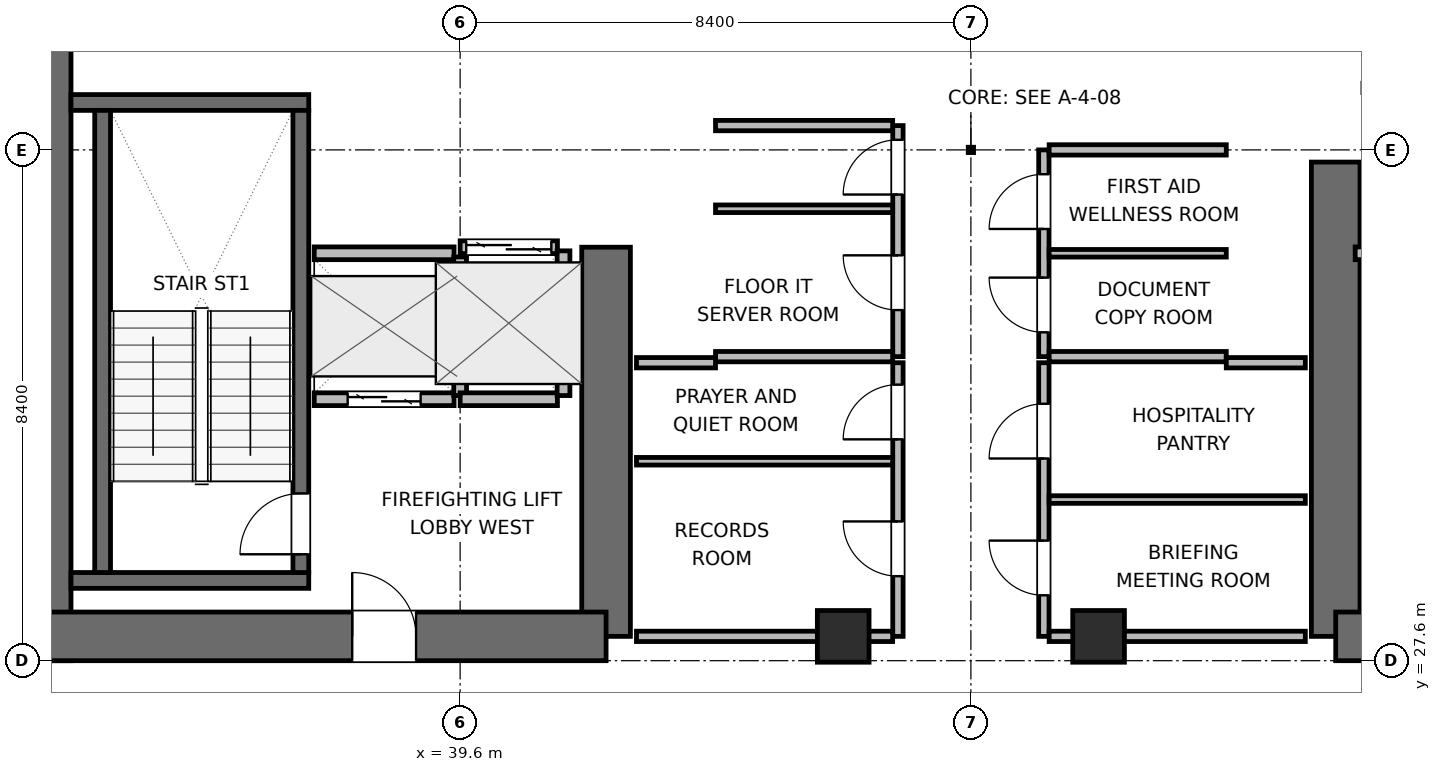
"""IFC4 building model, lengths in metres.
Left out: names, types, materials, properties, quantities, classifications, styles, units other than length and angle.
Written with IfcOpenShell. Run it as: python <this file> out.ifc"""

import sys

from ifc_helpers import new_model, si_unit, direction, frame, frame_2d, origin, origin_2d, place, context, subcontext, project, spatial, rectangle, extrude, element, fill, save


model = new_model("IFC4")
c1 = context("Model", 3, precision=1e-05, world=origin(), true_north=direction((0.0, 1.0)))
c2 = subcontext(c1, "Body", "Model", "MODEL_VIEW")
j1 = project(units=[si_unit("LENGTHUNIT", "METRE"), si_unit("PLANEANGLEUNIT", "RADIAN")], contexts=[c1])
p1 = place(None, origin())
s1 = spatial("IfcSite", under=j1, at=p1, CompositionType="ELEMENT")
p2 = place(p1, origin())
s2 = spatial("IfcBuilding", under=s1, at=p2, CompositionType="ELEMENT")
p3 = place(p2, frame((0.0, 0.0, 177.9)))
s3 = spatial("IfcBuildingStorey", under=s2, at=p3, CompositionType="ELEMENT", Elevation=177.9)
p4 = place(p3, frame((32.8, 27.6, 0.0), z_axis=(0.0, 0.0, 1.0), x_axis=(0.0, 1.0, 0.0)))
e1 = element("IfcWall", 1, at=p4, inside=s3, PredefinedType="SHEAR", context=c2, shape_type="SweptSolid", body=[
    extrude(rectangle(XDim=16.8, YDim=0.8, at=frame_2d((8.4, 0.0))), origin(), (0.0, 0.0, 1.0), 3.9),
])
p5 = place(p3, frame((42.0, 28.0, 0.0), z_axis=(0.0, 0.0, 1.0), x_axis=(0.0, 1.0, 0.0)))
e2 = element("IfcWall", 2, at=p5, inside=s3, PredefinedType="SHEAR", context=c2, shape_type="SweptSolid", body=[
    extrude(rectangle(XDim=6.4, YDim=0.8, at=frame_2d((3.2, 0.0))), origin(), (0.0, 0.0, 1.0), 3.9),
])
p6 = place(p3, frame((32.8, 28.0, 0.0), z_axis=(0.0, 0.0, 1.0), x_axis=(1.0, 0.0, 0.0)))
e3 = element("IfcWall", 3, at=p6, inside=s3, PredefinedType="SHEAR", context=c2, shape_type="SweptSolid", body=[
    extrude(rectangle(XDim=9.2, YDim=0.8, at=frame_2d((4.6, 0.0))), origin(), (0.0, 0.0, 1.0), 3.9),
])
p7 = place(p6, frame((5.025, 0.0, 0.0)))
e4 = element("IfcOpeningElement", 4, at=p7, cuts=e3, PredefinedType="OPENING", context=c2, shape_type="SweptSolid", body=[
    extrude(rectangle(XDim=1.05, YDim=2.04, at=frame_2d((0.525, 1.02))), frame((0.0, 0.41, 0.0), z_axis=(0.0, -1.0, 0.0), x_axis=(1.0, 0.0, 0.0)), (0.0, 0.0, 1.0), 0.82),
])
p8 = place(p3, frame((54.0, 28.0, 0.0), z_axis=(0.0, 0.0, 1.0), x_axis=(0.0, 1.0, 0.0)))
e5 = element("IfcWall", 5, at=p8, inside=s3, PredefinedType="SHEAR", context=c2, shape_type="SweptSolid", body=[
    extrude(rectangle(XDim=7.8, YDim=0.8, at=frame_2d((3.9, 0.0))), origin(), (0.0, 0.0, 1.0), 3.9),
])
p9 = place(p3, frame((54.0, 28.0, 0.0), z_axis=(0.0, 0.0, 1.0), x_axis=(1.0, 0.0, 0.0)))
e6 = element("IfcWall", 6, at=p9, inside=s3, PredefinedType="SHEAR", context=c2, shape_type="SweptSolid", body=[
    extrude(rectangle(XDim=9.2, YDim=0.8, at=frame_2d((4.6, 0.0))), origin(), (0.0, 0.0, 1.0), 3.9),
])
p10 = place(p9, frame((3.975, 0.0, 0.0)))
e7 = element("IfcOpeningElement", 7, at=p10, cuts=e6, PredefinedType="OPENING", context=c2, shape_type="SweptSolid", body=[
    extrude(rectangle(XDim=1.05, YDim=2.04, at=frame_2d((0.525, 1.02))), frame((0.0, 0.41, 0.0), z_axis=(0.0, -1.0, 0.0), x_axis=(1.0, 0.0, 0.0)), (0.0, 0.0, 1.0), 0.82),
])
for number, where, z_axis, x_axis in (
    (8, (33.2, 28.92, 0.0), (0.0, 0.0, 1.0), (1.0, 0.0, 0.0)),
    (9, (33.2, 36.78, 0.0), (0.0, 0.0, 1.0), (1.0, 0.0, 0.0)),
):
    element("IfcWall", number, at=place(p3, frame(where, z_axis=z_axis, x_axis=x_axis)), inside=s3, PredefinedType="SHEAR", context=c2, shape_type="SweptSolid", body=[
        extrude(rectangle(XDim=3.91, YDim=0.26, at=frame_2d((1.955, 0.0))), origin(), (0.0, 0.0, 1.0), 3.9),
    ])
p11 = place(p3, frame((33.72, 29.05, 0.0), z_axis=(0.0, 0.0, 1.0), x_axis=(0.0, 1.0, 0.0)))
e10 = element("IfcWall", 10, at=p11, inside=s3, PredefinedType="SHEAR", context=c2, shape_type="SweptSolid", body=[
    extrude(rectangle(XDim=7.6, YDim=0.26, at=frame_2d((3.8, 0.0))), origin(), (0.0, 0.0, 1.0), 3.9),
])
p12 = place(p3, frame((36.98, 29.05, 0.0), z_axis=(0.0, 0.0, 1.0), x_axis=(0.0, 1.0, 0.0)))
e11 = element("IfcWall", 11, at=p12, inside=s3, PredefinedType="SHEAR", context=c2, shape_type="SweptSolid", body=[
    extrude(rectangle(XDim=7.6, YDim=0.26, at=frame_2d((3.8, 0.0))), origin(), (0.0, 0.0, 1.0), 3.9),
])
p13 = place(p12, frame((0.3, 0.0, 0.0)))
e12 = element("IfcOpeningElement", 12, at=p13, cuts=e11, PredefinedType="OPENING", context=c2, shape_type="SweptSolid", body=[
    extrude(rectangle(XDim=1.0, YDim=2.04, at=frame_2d((0.5, 1.02))), frame((0.0, 0.14, 0.0), z_axis=(0.0, -1.0, 0.0), x_axis=(1.0, 0.0, 0.0)), (0.0, 0.0, 1.0), 0.28),
])
for number, where, z_axis, x_axis in (
    (13, (45.9, 28.0, 0.0), (0.0, 0.0, 1.0), (1.0, 0.0, 0.0)),
    (14, (50.1, 28.0, 0.0), (0.0, 0.0, 1.0), (1.0, 0.0, 0.0)),
):
    element("IfcColumn", number, at=place(p3, frame(where, z_axis=z_axis, x_axis=x_axis)), inside=s3, PredefinedType="COLUMN", context=c2, shape_type="SweptSolid", body=[
        extrude(rectangle(XDim=0.85, YDim=0.85, at=origin_2d()), origin(), (0.0, 0.0, 1.0), 3.9),
    ])
p14 = place(p3, frame((37.2, 31.9, 0.0), z_axis=(0.0, 0.0, 1.0), x_axis=(1.0, 0.0, 0.0)))
e15 = element("IfcWall", 15, at=p14, inside=s3, PredefinedType="PARTITIONING", context=c2, shape_type="SweptSolid", body=[
    extrude(rectangle(XDim=2.3, YDim=0.21, at=frame_2d((1.15, 0.0))), origin(), (0.0, 0.0, 1.0), 3.68),
])
p15 = place(p14, frame((0.55, 0.0, 0.0)))
e16 = element("IfcOpeningElement", 16, at=p15, cuts=e15, PredefinedType="OPENING", context=c2, shape_type="SweptSolid", body=[
    extrude(rectangle(XDim=1.2, YDim=2.04, at=frame_2d((0.6, 1.02))), frame((0.0, 0.115, 0.0), z_axis=(0.0, -1.0, 0.0), x_axis=(1.0, 0.0, 0.0)), (0.0, 0.0, 1.0), 0.23),
])
p16 = place(p3, frame((37.2, 34.3, 0.0), z_axis=(0.0, 0.0, 1.0), x_axis=(1.0, 0.0, 0.0)))
e17 = element("IfcWall", 17, at=p16, inside=s3, PredefinedType="PARTITIONING", context=c2, shape_type="SweptSolid", body=[
    extrude(rectangle(XDim=2.3, YDim=0.21, at=frame_2d((1.15, 0.0))), origin(), (0.0, 0.0, 1.0), 3.68),
])
p17 = place(p3, frame((39.6, 31.96, 0.0), z_axis=(0.0, 0.0, 1.0), x_axis=(0.0, 1.0, 0.0)))
e18 = element("IfcWall", 18, at=p17, inside=s3, PredefinedType="PARTITIONING", context=c2, shape_type="SweptSolid", body=[
    extrude(rectangle(XDim=2.28, YDim=0.21, at=frame_2d((1.14, 0.0))), origin(), (0.0, 0.0, 1.0), 3.68),
])
p18 = place(p3, frame((54.32, 34.3, 0.0), z_axis=(0.0, 0.0, 1.0), x_axis=(1.0, 0.0, 0.0)))
e19 = element("IfcWall", 19, at=p18, inside=s3, PredefinedType="PARTITIONING", context=c2, shape_type="SweptSolid", body=[
    extrude(rectangle(XDim=3.48, YDim=0.21, at=frame_2d((1.74, 0.0))), origin(), (0.0, 0.0, 1.0), 3.68),
])
p19 = place(p3, frame((39.6, 34.4, 0.0), z_axis=(0.0, 0.0, 1.0), x_axis=(1.0, 0.0, 0.0)))
e20 = element("IfcWall", 20, at=p19, inside=s3, PredefinedType="PARTITIONING", context=c2, shape_type="SweptSolid", body=[
    extrude(rectangle(XDim=1.6, YDim=0.21, at=frame_2d((0.8, 0.0))), origin(), (0.0, 0.0, 1.0), 3.68),
])
p20 = place(p19, frame((0.1, 0.0, 0.0)))
e21 = element("IfcOpeningElement", 21, at=p20, cuts=e20, PredefinedType="OPENING", context=c2, shape_type="SweptSolid", body=[
    extrude(rectangle(XDim=1.4, YDim=2.06, at=frame_2d((0.7, 1.03))), frame((0.0, 0.115, 0.0), z_axis=(0.0, -1.0, 0.0), x_axis=(1.0, 0.0, 0.0)), (0.0, 0.0, 1.0), 0.23),
])
p21 = place(p3, frame((39.6, 31.9, 0.0), z_axis=(0.0, 0.0, 1.0), x_axis=(1.0, 0.0, 0.0)))
e22 = element("IfcWall", 22, at=p21, inside=s3, PredefinedType="PARTITIONING", context=c2, shape_type="SweptSolid", body=[
    extrude(rectangle(XDim=1.6, YDim=0.21, at=frame_2d((0.8, 0.0))), origin(), (0.0, 0.0, 1.0), 3.68),
])
p22 = place(p3, frame((41.3, 31.96, 0.0), z_axis=(0.0, 0.0, 1.0), x_axis=(0.0, 1.0, 0.0)))
e23 = element("IfcWall", 23, at=p22, inside=s3, PredefinedType="PARTITIONING", context=c2, shape_type="SweptSolid", body=[
    extrude(rectangle(XDim=2.38, YDim=0.21, at=frame_2d((1.19, 0.0))), origin(), (0.0, 0.0, 1.0), 3.68),
])
p23 = place(p3, frame((46.8, 32.6, 0.0), z_axis=(0.0, 0.0, 1.0), x_axis=(0.0, 1.0, 0.0)))
e24 = element("IfcWall", 24, at=p23, inside=s3, PredefinedType="PARTITIONING", context=c2, shape_type="SweptSolid", body=[
    extrude(rectangle(XDim=3.8, YDim=0.17, at=frame_2d((1.9, 0.0))), origin(), (0.0, 0.0, 1.0), 3.68),
])
p24 = place(p23, frame((0.766, 0.0, 0.0)))
e25 = element("IfcOpeningElement", 25, at=p24, cuts=e24, PredefinedType="OPENING", context=c2, shape_type="SweptSolid", body=[
    extrude(rectangle(XDim=0.9, YDim=2.02, at=frame_2d((0.45, 1.01))), frame((0.0, 0.095, 0.0), z_axis=(0.0, -1.0, 0.0), x_axis=(1.0, 0.0, 0.0)), (0.0, 0.0, 1.0), 0.19),
])
p25 = place(p23, frame((2.666, 0.0, 0.0)))
e26 = element("IfcOpeningElement", 26, at=p25, cuts=e24, PredefinedType="OPENING", context=c2, shape_type="SweptSolid", body=[
    extrude(rectangle(XDim=0.9, YDim=2.02, at=frame_2d((0.45, 1.01))), frame((0.0, 0.095, 0.0), z_axis=(0.0, -1.0, 0.0), x_axis=(1.0, 0.0, 0.0)), (0.0, 0.0, 1.0), 0.19),
])
for number, where, z_axis, x_axis in (
    (27, (43.8, 32.6, 0.0), (0.0, 0.0, 1.0), (1.0, 0.0, 0.0)),
    (28, (43.8, 36.4, 0.0), (0.0, 0.0, 1.0), (1.0, 0.0, 0.0)),
):
    element("IfcWall", number, at=place(p3, frame(where, z_axis=z_axis, x_axis=x_axis)), inside=s3, PredefinedType="PARTITIONING", context=c2, shape_type="SweptSolid", body=[
        extrude(rectangle(XDim=2.913, YDim=0.17, at=frame_2d((1.457, 0.0))), origin(), (0.0, 0.0, 1.0), 3.68),
    ])
p26 = place(p3, frame((43.8, 35.032, 0.0), z_axis=(0.0, 0.0, 1.0), x_axis=(1.0, 0.0, 0.0)))
e29 = element("IfcWall", 29, at=p26, inside=s3, PredefinedType="PARTITIONING", context=c2, shape_type="SweptSolid", body=[
    extrude(rectangle(XDim=2.913, YDim=0.125, at=frame_2d((1.457, 0.0))), origin(), (0.0, 0.0, 1.0), 3.68),
])
p27 = place(p3, frame((49.2, 32.6, 0.0), z_axis=(0.0, 0.0, 1.0), x_axis=(0.0, 1.0, 0.0)))
e30 = element("IfcWall", 30, at=p27, inside=s3, PredefinedType="PARTITIONING", context=c2, shape_type="SweptSolid", body=[
    extrude(rectangle(XDim=3.4, YDim=0.17, at=frame_2d((1.7, 0.0))), origin(), (0.0, 0.0, 1.0), 3.68),
])
p28 = place(p27, frame((0.4, 0.0, 0.0)))
e31 = element("IfcOpeningElement", 31, at=p28, cuts=e30, PredefinedType="OPENING", context=c2, shape_type="SweptSolid", body=[
    extrude(rectangle(XDim=0.9, YDim=2.02, at=frame_2d((0.45, 1.01))), frame((0.0, 0.095, 0.0), z_axis=(0.0, -1.0, 0.0), x_axis=(1.0, 0.0, 0.0)), (0.0, 0.0, 1.0), 0.19),
])
p29 = place(p27, frame((2.1, 0.0, 0.0)))
e32 = element("IfcOpeningElement", 32, at=p29, cuts=e30, PredefinedType="OPENING", context=c2, shape_type="SweptSolid", body=[
    extrude(rectangle(XDim=0.9, YDim=2.02, at=frame_2d((0.45, 1.01))), frame((0.0, 0.095, 0.0), z_axis=(0.0, -1.0, 0.0), x_axis=(1.0, 0.0, 0.0)), (0.0, 0.0, 1.0), 0.19),
])
for number, where, z_axis, x_axis in (
    (33, (49.287, 32.6, 0.0), (0.0, 0.0, 1.0), (1.0, 0.0, 0.0)),
    (34, (49.287, 36.0, 0.0), (0.0, 0.0, 1.0), (1.0, 0.0, 0.0)),
):
    element("IfcWall", number, at=place(p3, frame(where, z_axis=z_axis, x_axis=x_axis)), inside=s3, PredefinedType="PARTITIONING", context=c2, shape_type="SweptSolid", body=[
        extrude(rectangle(XDim=2.913, YDim=0.17, at=frame_2d((1.457, 0.0))), origin(), (0.0, 0.0, 1.0), 3.68),
    ])
p30 = place(p3, frame((49.287, 34.3, 0.0), z_axis=(0.0, 0.0, 1.0), x_axis=(1.0, 0.0, 0.0)))
e35 = element("IfcWall", 35, at=p30, inside=s3, PredefinedType="PARTITIONING", context=c2, shape_type="SweptSolid", body=[
    extrude(rectangle(XDim=2.913, YDim=0.125, at=frame_2d((1.457, 0.0))), origin(), (0.0, 0.0, 1.0), 3.68),
])
p31 = place(p3, frame((46.8, 28.0, 0.0), z_axis=(0.0, 0.0, 1.0), x_axis=(0.0, 1.0, 0.0)))
e36 = element("IfcWall", 36, at=p31, inside=s3, PredefinedType="PARTITIONING", context=c2, shape_type="SweptSolid", body=[
    extrude(rectangle(XDim=4.5, YDim=0.17, at=frame_2d((2.25, 0.0))), origin(), (0.0, 0.0, 1.0), 3.68),
])
p32 = place(p31, frame((0.99, 0.0, 0.0)))
e37 = element("IfcOpeningElement", 37, at=p32, cuts=e36, PredefinedType="OPENING", context=c2, shape_type="SweptSolid", body=[
    extrude(rectangle(XDim=0.9, YDim=2.02, at=frame_2d((0.45, 1.01))), frame((0.0, 0.095, 0.0), z_axis=(0.0, -1.0, 0.0), x_axis=(1.0, 0.0, 0.0)), (0.0, 0.0, 1.0), 0.19),
])
p33 = place(p31, frame((3.24, 0.0, 0.0)))
e38 = element("IfcOpeningElement", 38, at=p33, cuts=e36, PredefinedType="OPENING", context=c2, shape_type="SweptSolid", body=[
    extrude(rectangle(XDim=0.9, YDim=2.02, at=frame_2d((0.45, 1.01))), frame((0.0, 0.095, 0.0), z_axis=(0.0, -1.0, 0.0), x_axis=(1.0, 0.0, 0.0)), (0.0, 0.0, 1.0), 0.19),
])
p34 = place(p3, frame((42.5, 28.0, 0.0), z_axis=(0.0, 0.0, 1.0), x_axis=(1.0, 0.0, 0.0)))
e39 = element("IfcWall", 39, at=p34, inside=s3, PredefinedType="PARTITIONING", context=c2, shape_type="SweptSolid", body=[
    extrude(rectangle(XDim=4.213, YDim=0.17, at=frame_2d((2.106, 0.0))), origin(), (0.0, 0.0, 1.0), 2.765),
])
p35 = place(p3, frame((42.5, 32.5, 0.0), z_axis=(0.0, 0.0, 1.0), x_axis=(1.0, 0.0, 0.0)))
e40 = element("IfcWall", 40, at=p35, inside=s3, PredefinedType="PARTITIONING", context=c2, shape_type="SweptSolid", body=[
    extrude(rectangle(XDim=1.3, YDim=0.17, at=frame_2d((0.65, 0.0))), origin(), (0.0, 0.0, 1.0), 3.68),
])
p36 = place(p3, frame((42.5, 30.88, 0.0), z_axis=(0.0, 0.0, 1.0), x_axis=(1.0, 0.0, 0.0)))
e41 = element("IfcWall", 41, at=p36, inside=s3, PredefinedType="PARTITIONING", context=c2, shape_type="SweptSolid", body=[
    extrude(rectangle(XDim=4.213, YDim=0.125, at=frame_2d((2.106, 0.0))), origin(), (0.0, 0.0, 1.0), 3.68),
])
p37 = place(p3, frame((49.2, 28.0, 0.0), z_axis=(0.0, 0.0, 1.0), x_axis=(0.0, 1.0, 0.0)))
e42 = element("IfcWall", 42, at=p37, inside=s3, PredefinedType="PARTITIONING", context=c2, shape_type="SweptSolid", body=[
    extrude(rectangle(XDim=4.5, YDim=0.17, at=frame_2d((2.25, 0.0))), origin(), (0.0, 0.0, 1.0), 3.68),
])
p38 = place(p37, frame((0.675, 0.0, 0.0)))
e43 = element("IfcOpeningElement", 43, at=p38, cuts=e42, PredefinedType="OPENING", context=c2, shape_type="SweptSolid", body=[
    extrude(rectangle(XDim=0.9, YDim=2.02, at=frame_2d((0.45, 1.01))), frame((0.0, 0.095, 0.0), z_axis=(0.0, -1.0, 0.0), x_axis=(1.0, 0.0, 0.0)), (0.0, 0.0, 1.0), 0.19),
])
p39 = place(p37, frame((2.925, 0.0, 0.0)))
e44 = element("IfcOpeningElement", 44, at=p39, cuts=e42, PredefinedType="OPENING", context=c2, shape_type="SweptSolid", body=[
    extrude(rectangle(XDim=0.9, YDim=2.02, at=frame_2d((0.45, 1.01))), frame((0.0, 0.095, 0.0), z_axis=(0.0, -1.0, 0.0), x_axis=(1.0, 0.0, 0.0)), (0.0, 0.0, 1.0), 0.19),
])
p40 = place(p3, frame((49.287, 28.0, 0.0), z_axis=(0.0, 0.0, 1.0), x_axis=(1.0, 0.0, 0.0)))
e45 = element("IfcWall", 45, at=p40, inside=s3, PredefinedType="PARTITIONING", context=c2, shape_type="SweptSolid", body=[
    extrude(rectangle(XDim=4.213, YDim=0.17, at=frame_2d((2.106, 0.0))), origin(), (0.0, 0.0, 1.0), 2.765),
])
p41 = place(p3, frame((52.2, 32.5, 0.0), z_axis=(0.0, 0.0, 1.0), x_axis=(1.0, 0.0, 0.0)))
e46 = element("IfcWall", 46, at=p41, inside=s3, PredefinedType="PARTITIONING", context=c2, shape_type="SweptSolid", body=[
    extrude(rectangle(XDim=1.3, YDim=0.17, at=frame_2d((0.65, 0.0))), origin(), (0.0, 0.0, 1.0), 3.68),
])
p42 = place(p3, frame((49.287, 30.25, 0.0), z_axis=(0.0, 0.0, 1.0), x_axis=(1.0, 0.0, 0.0)))
e47 = element("IfcWall", 47, at=p42, inside=s3, PredefinedType="PARTITIONING", context=c2, shape_type="SweptSolid", body=[
    extrude(rectangle(XDim=4.213, YDim=0.125, at=frame_2d((2.106, 0.0))), origin(), (0.0, 0.0, 1.0), 3.68),
])
p43 = place(p13, origin())
e48 = element("IfcDoor", 48, at=p43, inside=s3, OperationType="SINGLE_SWING_LEFT", PredefinedType="DOOR", context=c2, shape_type="SweptSolid", body=[
    extrude(rectangle(XDim=1.0, YDim=2.04, at=frame_2d((0.5, 1.02))), frame((0.0, 0.025, 0.0), z_axis=(0.0, -1.0, 0.0), x_axis=(1.0, 0.0, 0.0)), (0.0, 0.0, 1.0), 0.05),
])
fill(e12, e48)
p44 = place(p15, origin())
e49 = element("IfcDoor", 49, at=p44, inside=s3, OperationType="DOUBLE_DOOR_SLIDING", PredefinedType="DOOR", context=c2, shape_type="SweptSolid", body=[
    extrude(rectangle(XDim=1.2, YDim=2.04, at=frame_2d((0.6, 1.02))), frame((0.0, 0.025, 0.0), z_axis=(0.0, -1.0, 0.0), x_axis=(1.0, 0.0, 0.0)), (0.0, 0.0, 1.0), 0.05),
])
fill(e16, e49)
p45 = place(p20, origin())
e50 = element("IfcDoor", 50, at=p45, inside=s3, OperationType="DOUBLE_DOOR_SLIDING", PredefinedType="DOOR", context=c2, shape_type="SweptSolid", body=[
    extrude(rectangle(XDim=1.4, YDim=2.06, at=frame_2d((0.7, 1.03))), frame((0.0, 0.025, 0.0), z_axis=(0.0, -1.0, 0.0), x_axis=(1.0, 0.0, 0.0)), (0.0, 0.0, 1.0), 0.05),
])
fill(e21, e50)
p46 = place(p7, origin())
e51 = element("IfcDoor", 51, at=p46, inside=s3, OperationType="SINGLE_SWING_LEFT", PredefinedType="DOOR", context=c2, shape_type="SweptSolid", body=[
    extrude(rectangle(XDim=1.05, YDim=2.04, at=frame_2d((0.525, 1.02))), frame((0.0, 0.025, 0.0), z_axis=(0.0, -1.0, 0.0), x_axis=(1.0, 0.0, 0.0)), (0.0, 0.0, 1.0), 0.05),
])
fill(e4, e51)
p47 = place(p24, origin())
e52 = element("IfcDoor", 52, at=p47, inside=s3, OperationType="SINGLE_SWING_RIGHT", PredefinedType="DOOR", context=c2, shape_type="SweptSolid", body=[
    extrude(rectangle(XDim=0.9, YDim=2.02, at=frame_2d((0.45, 1.01))), frame((0.0, 0.025, 0.0), z_axis=(0.0, -1.0, 0.0), x_axis=(1.0, 0.0, 0.0)), (0.0, 0.0, 1.0), 0.05),
])
fill(e25, e52)
p48 = place(p25, origin())
e53 = element("IfcDoor", 53, at=p48, inside=s3, OperationType="SINGLE_SWING_LEFT", PredefinedType="DOOR", context=c2, shape_type="SweptSolid", body=[
    extrude(rectangle(XDim=0.9, YDim=2.02, at=frame_2d((0.45, 1.01))), frame((0.0, 0.025, 0.0), z_axis=(0.0, -1.0, 0.0), x_axis=(1.0, 0.0, 0.0)), (0.0, 0.0, 1.0), 0.05),
])
fill(e26, e53)
p49 = place(p28, origin())
e54 = element("IfcDoor", 54, at=p49, inside=s3, OperationType="SINGLE_SWING_RIGHT", PredefinedType="DOOR", context=c2, shape_type="SweptSolid", body=[
    extrude(rectangle(XDim=0.9, YDim=2.02, at=frame_2d((0.45, 1.01))), frame((0.0, 0.025, 0.0), z_axis=(0.0, -1.0, 0.0), x_axis=(1.0, 0.0, 0.0)), (0.0, 0.0, 1.0), 0.05),
])
fill(e31, e54)
p50 = place(p29, origin())
e55 = element("IfcDoor", 55, at=p50, inside=s3, OperationType="SINGLE_SWING_LEFT", PredefinedType="DOOR", context=c2, shape_type="SweptSolid", body=[
    extrude(rectangle(XDim=0.9, YDim=2.02, at=frame_2d((0.45, 1.01))), frame((0.0, 0.025, 0.0), z_axis=(0.0, -1.0, 0.0), x_axis=(1.0, 0.0, 0.0)), (0.0, 0.0, 1.0), 0.05),
])
fill(e32, e55)
p51 = place(p32, origin())
e56 = element("IfcDoor", 56, at=p51, inside=s3, OperationType="SINGLE_SWING_RIGHT", PredefinedType="DOOR", context=c2, shape_type="SweptSolid", body=[
    extrude(rectangle(XDim=0.9, YDim=2.02, at=frame_2d((0.45, 1.01))), frame((0.0, 0.025, 0.0), z_axis=(0.0, -1.0, 0.0), x_axis=(1.0, 0.0, 0.0)), (0.0, 0.0, 1.0), 0.05),
])
fill(e37, e56)
p52 = place(p33, origin())
e57 = element("IfcDoor", 57, at=p52, inside=s3, OperationType="SINGLE_SWING_LEFT", PredefinedType="DOOR", context=c2, shape_type="SweptSolid", body=[
    extrude(rectangle(XDim=0.9, YDim=2.02, at=frame_2d((0.45, 1.01))), frame((0.0, 0.025, 0.0), z_axis=(0.0, -1.0, 0.0), x_axis=(1.0, 0.0, 0.0)), (0.0, 0.0, 1.0), 0.05),
])
fill(e38, e57)
p53 = place(p38, origin())
e58 = element("IfcDoor", 58, at=p53, inside=s3, OperationType="SINGLE_SWING_RIGHT", PredefinedType="DOOR", context=c2, shape_type="SweptSolid", body=[
    extrude(rectangle(XDim=0.9, YDim=2.02, at=frame_2d((0.45, 1.01))), frame((0.0, 0.025, 0.0), z_axis=(0.0, -1.0, 0.0), x_axis=(1.0, 0.0, 0.0)), (0.0, 0.0, 1.0), 0.05),
])
fill(e43, e58)
p54 = place(p39, origin())
e59 = element("IfcDoor", 59, at=p54, inside=s3, OperationType="SINGLE_SWING_LEFT", PredefinedType="DOOR", context=c2, shape_type="SweptSolid", body=[
    extrude(rectangle(XDim=0.9, YDim=2.02, at=frame_2d((0.45, 1.01))), frame((0.0, 0.025, 0.0), z_axis=(0.0, -1.0, 0.0), x_axis=(1.0, 0.0, 0.0)), (0.0, 0.0, 1.0), 0.05),
])
fill(e44, e59)
save(model, sys.argv[1])
